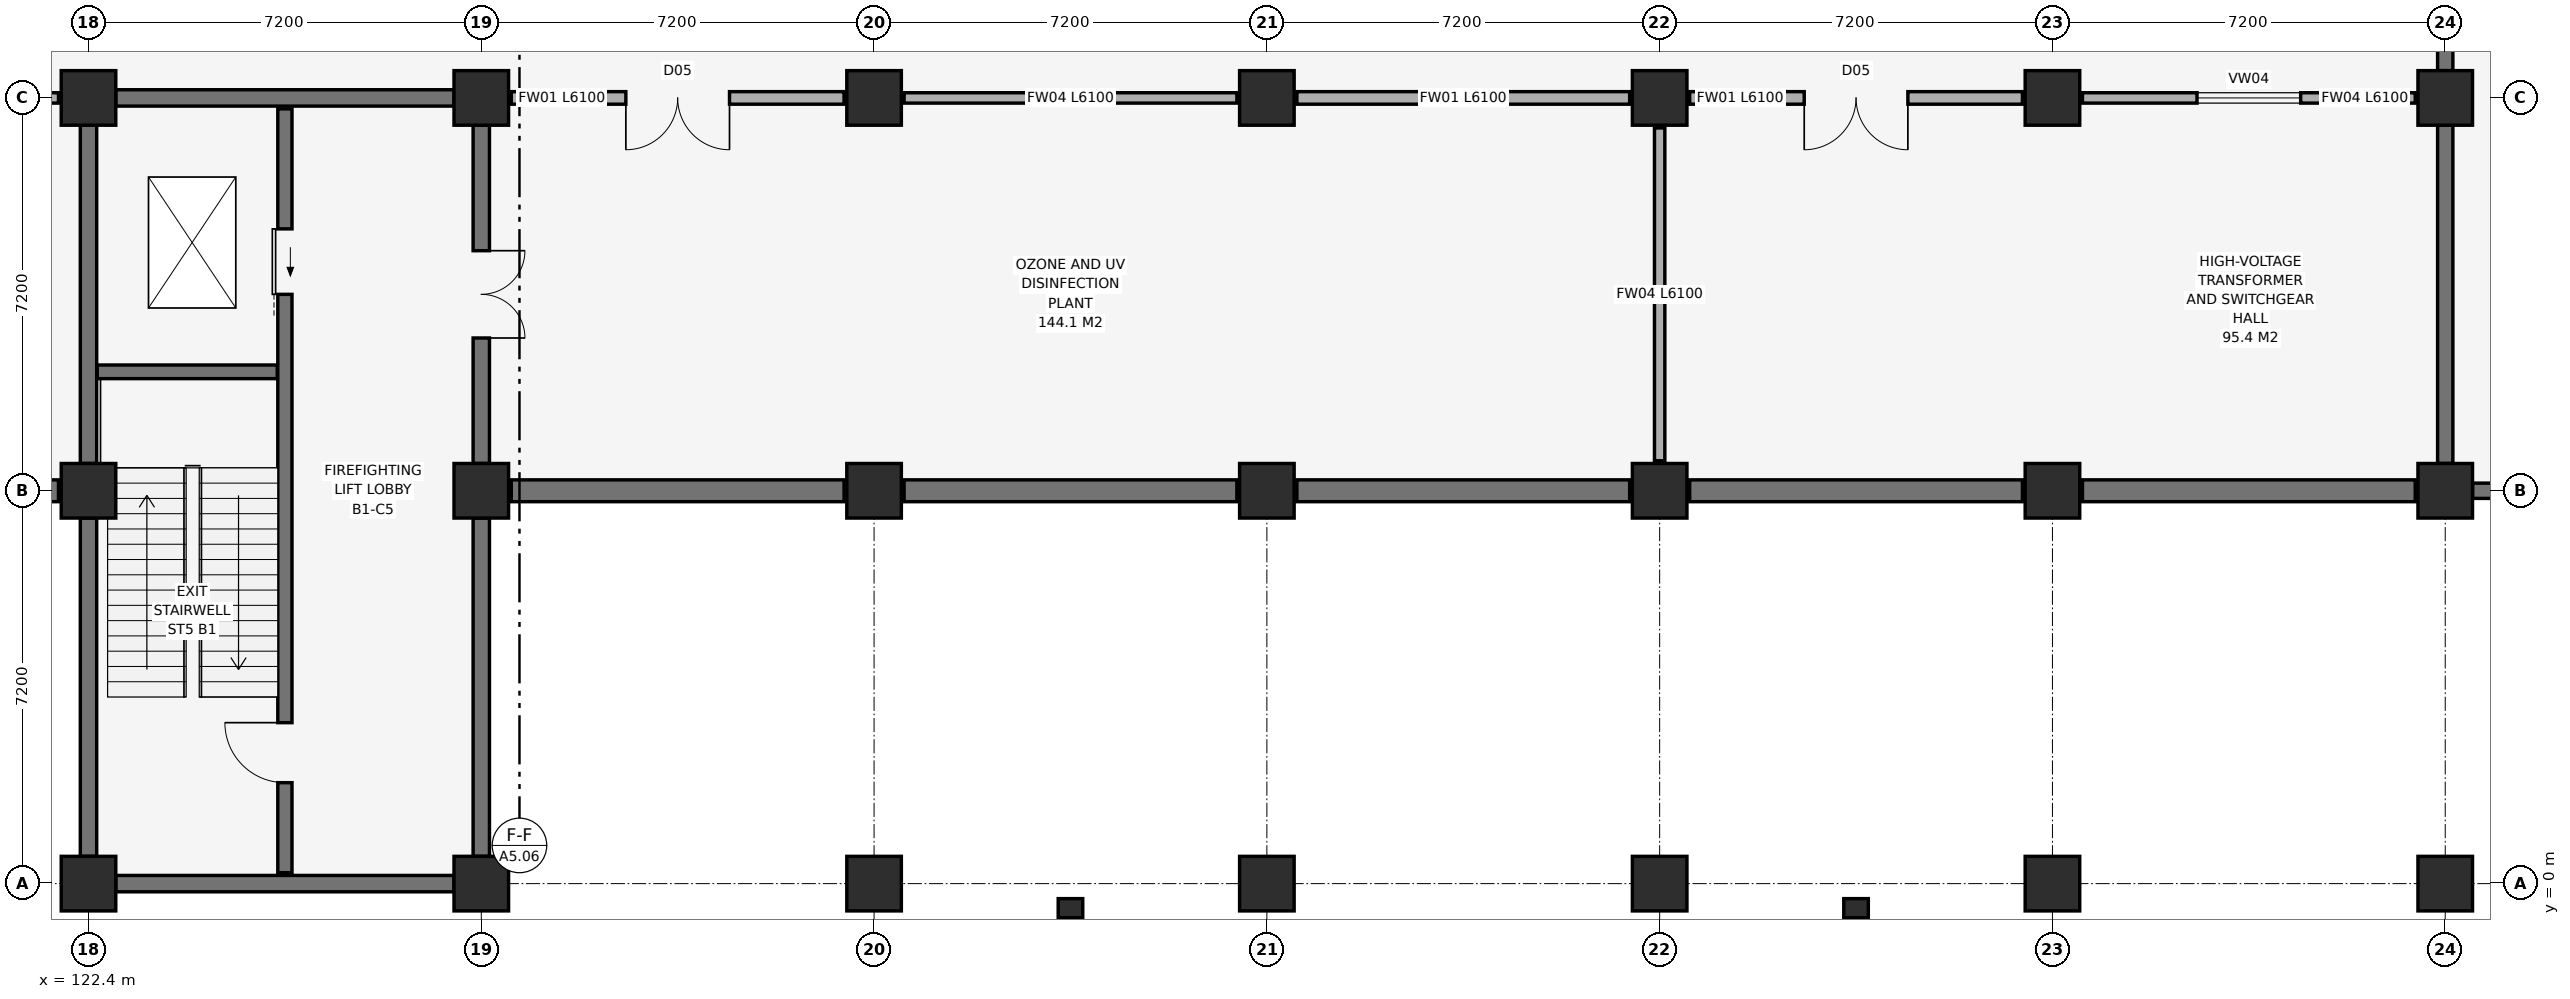
"""IFC4 building model, lengths in metres.
Left out: names, types, materials, properties, quantities, classifications, styles, units other than length and angle.
Written with IfcOpenShell. Run it as: python <this file> out.ifc"""

import sys

from ifc_helpers import new_model, si_unit, direction, frame, frame_2d, origin, origin_2d, place, context, subcontext, project, spatial, rectangle, extrude, element, fill, save


model = new_model("IFC4")
c1 = context("Model", 3, precision=1e-05, world=origin(), true_north=direction((0.0, 1.0)))
c2 = subcontext(c1, "Body", "Model", "MODEL_VIEW")
j1 = project(units=[si_unit("LENGTHUNIT", "METRE"), si_unit("PLANEANGLEUNIT", "RADIAN")], contexts=[c1])
p1 = place(None, origin())
s1 = spatial("IfcSite", under=j1, at=p1, CompositionType="ELEMENT")
p2 = place(p1, origin())
s2 = spatial("IfcBuilding", under=s1, at=p2, CompositionType="ELEMENT")
p3 = place(p2, frame((0.0, 0.0, -5.4)))
s3 = spatial("IfcBuildingStorey", under=s2, at=p3, CompositionType="ELEMENT", Elevation=-5.4)
for number, where, z_axis, x_axis in (
    (1, (122.4, 0.0, -0.45), (0.0, 0.0, 1.0), (1.0, 0.0, 0.0)),
    (2, (122.4, 7.2, -0.45), (0.0, 0.0, 1.0), (1.0, 0.0, 0.0)),
    (3, (122.4, 14.4, -0.45), (0.0, 0.0, 1.0), (1.0, 0.0, 0.0)),
    (4, (129.6, 0.0, -0.45), (0.0, 0.0, 1.0), (1.0, 0.0, 0.0)),
    (5, (129.6, 7.2, -0.45), (0.0, 0.0, 1.0), (1.0, 0.0, 0.0)),
    (6, (129.6, 14.4, -0.45), (0.0, 0.0, 1.0), (1.0, 0.0, 0.0)),
    (7, (136.8, 0.0, -0.45), (0.0, 0.0, 1.0), (1.0, 0.0, 0.0)),
    (8, (136.8, 7.2, -0.45), (0.0, 0.0, 1.0), (1.0, 0.0, 0.0)),
    (9, (136.8, 14.4, -0.45), (0.0, 0.0, 1.0), (1.0, 0.0, 0.0)),
    (10, (144.0, 0.0, -0.45), (0.0, 0.0, 1.0), (1.0, 0.0, 0.0)),
    (11, (144.0, 7.2, -0.45), (0.0, 0.0, 1.0), (1.0, 0.0, 0.0)),
    (12, (144.0, 14.4, -0.45), (0.0, 0.0, 1.0), (1.0, 0.0, 0.0)),
    (13, (151.2, 0.0, -0.45), (0.0, 0.0, 1.0), (1.0, 0.0, 0.0)),
    (14, (151.2, 7.2, -0.45), (0.0, 0.0, 1.0), (1.0, 0.0, 0.0)),
    (15, (151.2, 14.4, -0.45), (0.0, 0.0, 1.0), (1.0, 0.0, 0.0)),
    (16, (158.4, 0.0, -0.45), (0.0, 0.0, 1.0), (1.0, 0.0, 0.0)),
    (17, (158.4, 7.2, -0.45), (0.0, 0.0, 1.0), (1.0, 0.0, 0.0)),
    (18, (158.4, 14.4, -0.45), (0.0, 0.0, 1.0), (1.0, 0.0, 0.0)),
    (19, (165.6, 0.0, -0.45), (0.0, 0.0, 1.0), (1.0, 0.0, 0.0)),
    (20, (165.6, 7.2, -0.45), (0.0, 0.0, 1.0), (1.0, 0.0, 0.0)),
    (21, (165.6, 14.4, -0.45), (0.0, 0.0, 1.0), (1.0, 0.0, 0.0)),
):
    element("IfcColumn", number, at=place(p3, frame(where, z_axis=z_axis, x_axis=x_axis)), inside=s3, PredefinedType="COLUMN", context=c2, shape_type="SweptSolid", body=[
        extrude(rectangle(XDim=1.0, YDim=1.0, at=origin_2d()), origin(), (0.0, 0.0, 1.0), 5.85),
    ])
for number, where, z_axis, x_axis in (
    (22, (115.75, 7.2, 0.0), (0.0, 0.0, 1.0), (1.0, 0.0, 0.0)),
    (23, (130.15, 7.2, 0.0), (0.0, 0.0, 1.0), (1.0, 0.0, 0.0)),
):
    element("IfcWall", number, at=place(p3, frame(where, z_axis=z_axis, x_axis=x_axis)), inside=s3, PredefinedType="USERDEFINED", context=c2, shape_type="SweptSolid", body=[
        extrude(rectangle(XDim=6.1, YDim=0.4, at=frame_2d((3.05, 0.0))), origin(), (0.0, 0.0, 1.0), 5.12),
    ])
for number, where, z_axis, x_axis in (
    (24, (137.35, 7.2, 0.0), (0.0, 0.0, 1.0), (1.0, 0.0, 0.0)),
    (25, (144.55, 7.2, 0.0), (0.0, 0.0, 1.0), (1.0, 0.0, 0.0)),
):
    element("IfcWall", number, at=place(p3, frame(where, z_axis=z_axis, x_axis=x_axis)), inside=s3, PredefinedType="USERDEFINED", context=c2, shape_type="SweptSolid", body=[
        extrude(rectangle(XDim=6.1, YDim=0.4, at=frame_2d((3.05, 0.0))), origin(), (0.0, 0.0, 1.0), 5.12),
    ])
for number, where, z_axis, x_axis in (
    (26, (151.75, 7.2, 0.0), (0.0, 0.0, 1.0), (1.0, 0.0, 0.0)),
    (27, (158.95, 7.2, 0.0), (0.0, 0.0, 1.0), (1.0, 0.0, 0.0)),
):
    element("IfcWall", number, at=place(p3, frame(where, z_axis=z_axis, x_axis=x_axis)), inside=s3, PredefinedType="USERDEFINED", context=c2, shape_type="SweptSolid", body=[
        extrude(rectangle(XDim=6.1, YDim=0.4, at=frame_2d((3.05, 0.0))), origin(), (0.0, 0.0, 1.0), 5.12),
    ])
for number, where, z_axis, x_axis in (
    (28, (122.9, 0.0, 0.0), (0.0, 0.0, 1.0), (1.0, 0.0, 0.0)),
    (29, (122.9, 14.4, 0.0), (0.0, 0.0, 1.0), (1.0, 0.0, 0.0)),
):
    element("IfcWall", number, at=place(p3, frame(where, z_axis=z_axis, x_axis=x_axis)), inside=s3, PredefinedType="SHEAR", context=c2, shape_type="SweptSolid", body=[
        extrude(rectangle(XDim=6.2, YDim=0.3, at=frame_2d((3.1, 0.0))), origin(), (0.0, 0.0, 1.0), 5.12),
    ])
for number, where, z_axis, x_axis in (
    (30, (122.4, 0.5, 0.0), (0.0, 0.0, 1.0), (0.0, 1.0, 0.0)),
    (31, (122.4, 7.7, 0.0), (0.0, 0.0, 1.0), (0.0, 1.0, 0.0)),
    (32, (129.6, 0.5, 0.0), (0.0, 0.0, 1.0), (0.0, 1.0, 0.0)),
):
    element("IfcWall", number, at=place(p3, frame(where, z_axis=z_axis, x_axis=x_axis)), inside=s3, PredefinedType="SHEAR", context=c2, shape_type="SweptSolid", body=[
        extrude(rectangle(XDim=6.2, YDim=0.3, at=frame_2d((3.1, 0.0))), origin(), (0.0, 0.0, 1.0), 5.12),
    ])
p4 = place(p3, frame((129.6, 7.7, 0.0), z_axis=(0.0, 0.0, 1.0), x_axis=(0.0, 1.0, 0.0)))
e33 = element("IfcWall", 33, at=p4, inside=s3, PredefinedType="SHEAR", context=c2, shape_type="SweptSolid", body=[
    extrude(rectangle(XDim=6.2, YDim=0.3, at=frame_2d((3.1, 0.0))), origin(), (0.0, 0.0, 1.0), 5.12),
])
p5 = place(p4, frame((2.3, 0.0, 0.0)))
e34 = element("IfcOpeningElement", 34, at=p5, cuts=e33, PredefinedType="OPENING", context=c2, shape_type="SweptSolid", body=[
    extrude(rectangle(XDim=1.6, YDim=2.2, at=frame_2d((0.8, 1.1))), frame((0.0, 0.165, 0.0), z_axis=(0.0, -1.0, 0.0), x_axis=(1.0, 0.0, 0.0)), (0.0, 0.0, 1.0), 0.33),
])
p6 = place(p3, frame((126.0, 0.2, 0.0), z_axis=(0.0, 0.0, 1.0), x_axis=(0.0, 1.0, 0.0)))
e35 = element("IfcWall", 35, at=p6, inside=s3, PredefinedType="SHEAR", context=c2, shape_type="SweptSolid", body=[
    extrude(rectangle(XDim=14.0, YDim=0.26, at=frame_2d((7.0, 0.0))), origin(), (0.0, 0.0, 1.0), 5.12),
])
p7 = place(p6, frame((1.65, 0.0, 0.0)))
e36 = element("IfcOpeningElement", 36, at=p7, cuts=e35, PredefinedType="OPENING", context=c2, shape_type="SweptSolid", body=[
    extrude(rectangle(XDim=1.1, YDim=2.15, at=frame_2d((0.55, 1.075))), frame((0.0, 0.145, 0.0), z_axis=(0.0, -1.0, 0.0), x_axis=(1.0, 0.0, 0.0)), (0.0, 0.0, 1.0), 0.29),
])
p8 = place(p6, frame((10.6, 0.0, 0.0)))
e37 = element("IfcOpeningElement", 37, at=p8, cuts=e35, PredefinedType="OPENING", context=c2, shape_type="SweptSolid", body=[
    extrude(rectangle(XDim=1.2, YDim=2.25, at=frame_2d((0.6, 1.125))), frame((0.0, 0.145, 0.0), z_axis=(0.0, -1.0, 0.0), x_axis=(1.0, 0.0, 0.0)), (0.0, 0.0, 1.0), 0.29),
])
p9 = place(p3, frame((122.56, 9.38, 0.0), z_axis=(0.0, 0.0, 1.0), x_axis=(1.0, 0.0, 0.0)))
e38 = element("IfcWall", 38, at=p9, inside=s3, PredefinedType="SHEAR", context=c2, shape_type="SweptSolid", body=[
    extrude(rectangle(XDim=3.3, YDim=0.25, at=frame_2d((1.65, 0.0))), origin(), (0.0, 0.0, 1.0), 5.12),
])
for number, where, z_axis, x_axis in (
    (39, (166.1, 7.2, 0.0), (0.0, 0.0, 1.0), (1.0, 0.0, 0.0)),
    (40, (165.6, 7.7, 0.0), (0.0, 0.0, 1.0), (0.0, 1.0, 0.0)),
):
    element("IfcWall", number, at=place(p3, frame(where, z_axis=z_axis, x_axis=x_axis)), inside=s3, PredefinedType="SHEAR", context=c2, shape_type="SweptSolid", body=[
        extrude(rectangle(XDim=6.2, YDim=0.28, at=frame_2d((3.1, 0.0))), origin(), (0.0, 0.0, 1.0), 5.12),
    ])
p10 = place(p3, frame((165.6, 14.9, 0.0), z_axis=(0.0, 0.0, 1.0), x_axis=(0.0, 1.0, 0.0)))
e41 = element("IfcWall", 41, at=p10, inside=s3, PredefinedType="SHEAR", context=c2, shape_type="SweptSolid", body=[
    extrude(rectangle(XDim=6.2, YDim=0.28, at=frame_2d((3.1, 0.0))), origin(), (0.0, 0.0, 1.0), 5.12),
])
p11 = place(p10, frame((2.3, 0.0, 0.0)))
e42 = element("IfcOpeningElement", 42, at=p11, cuts=e41, PredefinedType="OPENING", context=c2, shape_type="SweptSolid", body=[
    extrude(rectangle(XDim=1.6, YDim=2.2, at=frame_2d((0.8, 1.1))), frame((0.0, 0.155, 0.0), z_axis=(0.0, -1.0, 0.0), x_axis=(1.0, 0.0, 0.0)), (0.0, 0.0, 1.0), 0.31),
])
p12 = place(p3, frame((115.75, 14.4, 0.0), z_axis=(0.0, 0.0, 1.0), x_axis=(1.0, 0.0, 0.0)))
e43 = element("IfcWall", 43, at=p12, inside=s3, PredefinedType="SOLIDWALL", context=c2, shape_type="SweptSolid", body=[
    extrude(rectangle(XDim=6.1, YDim=0.19, at=frame_2d((3.05, 0.0))), origin(), (0.0, 0.0, 1.0), 4.17),
])
p13 = place(p12, frame((2.1, 0.0, 0.0)))
e44 = element("IfcOpeningElement", 44, at=p13, cuts=e43, PredefinedType="OPENING", context=c2, shape_type="SweptSolid", body=[
    extrude(rectangle(XDim=1.9, YDim=2.35, at=frame_2d((0.95, 1.175))), frame((0.0, 0.11, 0.0), z_axis=(0.0, -1.0, 0.0), x_axis=(1.0, 0.0, 0.0)), (0.0, 0.0, 1.0), 0.22),
])
p14 = place(p3, frame((130.15, 14.4, 0.0), z_axis=(0.0, 0.0, 1.0), x_axis=(1.0, 0.0, 0.0)))
e45 = element("IfcWall", 45, at=p14, inside=s3, PredefinedType="SOLIDWALL", context=c2, shape_type="SweptSolid", body=[
    extrude(rectangle(XDim=6.1, YDim=0.23, at=frame_2d((3.05, 0.0))), origin(), (0.0, 0.0, 1.0), 4.17),
])
p15 = place(p14, frame((2.1, 0.0, 0.0)))
e46 = element("IfcOpeningElement", 46, at=p15, cuts=e45, PredefinedType="OPENING", context=c2, shape_type="SweptSolid", body=[
    extrude(rectangle(XDim=1.9, YDim=2.35, at=frame_2d((0.95, 1.175))), frame((0.0, 0.13, 0.0), z_axis=(0.0, -1.0, 0.0), x_axis=(1.0, 0.0, 0.0)), (0.0, 0.0, 1.0), 0.26),
])
p16 = place(p3, frame((137.35, 14.4, 0.0), z_axis=(0.0, 0.0, 1.0), x_axis=(1.0, 0.0, 0.0)))
e47 = element("IfcWall", 47, at=p16, inside=s3, PredefinedType="SOLIDWALL", context=c2, shape_type="SweptSolid", body=[
    extrude(rectangle(XDim=6.1, YDim=0.19, at=frame_2d((3.05, 0.0))), origin(), (0.0, 0.0, 1.0), 4.17),
])
p17 = place(p3, frame((144.55, 14.4, 0.0), z_axis=(0.0, 0.0, 1.0), x_axis=(1.0, 0.0, 0.0)))
e48 = element("IfcWall", 48, at=p17, inside=s3, PredefinedType="SOLIDWALL", context=c2, shape_type="SweptSolid", body=[
    extrude(rectangle(XDim=6.1, YDim=0.23, at=frame_2d((3.05, 0.0))), origin(), (0.0, 0.0, 1.0), 4.17),
])
p18 = place(p3, frame((151.2, 7.75, 0.0), z_axis=(0.0, 0.0, 1.0), x_axis=(0.0, 1.0, 0.0)))
e49 = element("IfcWall", 49, at=p18, inside=s3, PredefinedType="SOLIDWALL", context=c2, shape_type="SweptSolid", body=[
    extrude(rectangle(XDim=6.1, YDim=0.19, at=frame_2d((3.05, 0.0))), origin(), (0.0, 0.0, 1.0), 4.37),
])
p19 = place(p3, frame((151.75, 14.4, 0.0), z_axis=(0.0, 0.0, 1.0), x_axis=(1.0, 0.0, 0.0)))
e50 = element("IfcWall", 50, at=p19, inside=s3, PredefinedType="SOLIDWALL", context=c2, shape_type="SweptSolid", body=[
    extrude(rectangle(XDim=6.1, YDim=0.23, at=frame_2d((3.05, 0.0))), origin(), (0.0, 0.0, 1.0), 4.17),
])
p20 = place(p19, frame((2.1, 0.0, 0.0)))
e51 = element("IfcOpeningElement", 51, at=p20, cuts=e50, PredefinedType="OPENING", context=c2, shape_type="SweptSolid", body=[
    extrude(rectangle(XDim=1.9, YDim=2.35, at=frame_2d((0.95, 1.175))), frame((0.0, 0.13, 0.0), z_axis=(0.0, -1.0, 0.0), x_axis=(1.0, 0.0, 0.0)), (0.0, 0.0, 1.0), 0.26),
])
p21 = place(p3, frame((158.95, 14.4, 0.0), z_axis=(0.0, 0.0, 1.0), x_axis=(1.0, 0.0, 0.0)))
e52 = element("IfcWall", 52, at=p21, inside=s3, PredefinedType="SOLIDWALL", context=c2, shape_type="SweptSolid", body=[
    extrude(rectangle(XDim=6.1, YDim=0.19, at=frame_2d((3.05, 0.0))), origin(), (0.0, 0.0, 1.0), 4.17),
])
p22 = place(p21, frame((2.1, 0.0, 0.95)))
e53 = element("IfcOpeningElement", 53, at=p22, cuts=e52, PredefinedType="OPENING", context=c2, shape_type="SweptSolid", body=[
    extrude(rectangle(XDim=1.9, YDim=1.5, at=frame_2d((0.95, 0.75))), frame((0.0, 0.11, 0.0), z_axis=(0.0, -1.0, 0.0), x_axis=(1.0, 0.0, 0.0)), (0.0, 0.0, 1.0), 0.22),
])
for number, where, z_axis, x_axis in (
    (54, (140.4, -0.45, -0.45), (0.0, 0.0, 1.0), (1.0, 0.0, 0.0)),
    (55, (154.8, -0.45, -0.45), (0.0, 0.0, 1.0), (1.0, 0.0, 0.0)),
):
    element("IfcColumn", number, at=place(p3, frame(where, z_axis=z_axis, x_axis=x_axis)), inside=s3, PredefinedType="PILASTER", context=c2, shape_type="SweptSolid", body=[
        extrude(rectangle(XDim=0.45, YDim=0.35, at=origin_2d()), origin(), (0.0, 0.0, 1.0), 5.85),
    ])
p23 = place(p7, origin())
e56 = element("IfcDoor", 56, at=p23, inside=s3, OperationType="SINGLE_SWING_RIGHT", PredefinedType="DOOR", context=c2, shape_type="SweptSolid", body=[
    extrude(rectangle(XDim=1.1, YDim=2.15, at=frame_2d((0.55, 1.075))), frame((0.0, 0.025, 0.0), z_axis=(0.0, -1.0, 0.0), x_axis=(1.0, 0.0, 0.0)), (0.0, 0.0, 1.0), 0.05),
])
fill(e36, e56)
p24 = place(p8, frame((1.2, 0.0, 0.0), z_axis=(0.0, 0.0, 1.0), x_axis=(-1.0, 0.0, 0.0)))
e57 = element("IfcDoor", 57, at=p24, inside=s3, OperationType="SLIDING_TO_LEFT", PredefinedType="DOOR", context=c2, shape_type="SweptSolid", body=[
    extrude(rectangle(XDim=1.2, YDim=2.25, at=frame_2d((0.6, 1.125))), frame((0.0, 0.025, 0.0), z_axis=(0.0, -1.0, 0.0), x_axis=(1.0, 0.0, 0.0)), (0.0, 0.0, 1.0), 0.05),
])
fill(e37, e57)
p25 = place(p5, frame((1.6, 0.0, 0.0), z_axis=(0.0, 0.0, 1.0), x_axis=(-1.0, 0.0, 0.0)))
e58 = element("IfcDoor", 58, at=p25, inside=s3, OperationType="DOUBLE_SWING_LEFT", PredefinedType="DOOR", context=c2, shape_type="SweptSolid", body=[
    extrude(rectangle(XDim=1.6, YDim=2.2, at=frame_2d((0.8, 1.1))), frame((0.0, 0.025, 0.0), z_axis=(0.0, -1.0, 0.0), x_axis=(1.0, 0.0, 0.0)), (0.0, 0.0, 1.0), 0.05),
])
fill(e34, e58)
p26 = place(p15, frame((1.9, 0.0, 0.0), z_axis=(0.0, 0.0, 1.0), x_axis=(-1.0, 0.0, 0.0)))
e59 = element("IfcDoor", 59, at=p26, inside=s3, OperationType="DOUBLE_SWING_LEFT", PredefinedType="DOOR", context=c2, shape_type="SweptSolid", body=[
    extrude(rectangle(XDim=1.9, YDim=2.35, at=frame_2d((0.95, 1.175))), frame((0.0, 0.025, 0.0), z_axis=(0.0, -1.0, 0.0), x_axis=(1.0, 0.0, 0.0)), (0.0, 0.0, 1.0), 0.05),
])
fill(e46, e59)
p27 = place(p20, frame((1.9, 0.0, 0.0), z_axis=(0.0, 0.0, 1.0), x_axis=(-1.0, 0.0, 0.0)))
e60 = element("IfcDoor", 60, at=p27, inside=s3, OperationType="DOUBLE_SWING_LEFT", PredefinedType="DOOR", context=c2, shape_type="SweptSolid", body=[
    extrude(rectangle(XDim=1.9, YDim=2.35, at=frame_2d((0.95, 1.175))), frame((0.0, 0.025, 0.0), z_axis=(0.0, -1.0, 0.0), x_axis=(1.0, 0.0, 0.0)), (0.0, 0.0, 1.0), 0.05),
])
fill(e51, e60)
p28 = place(p22, origin())
e61 = element("IfcWindow", 61, at=p28, inside=s3, PartitioningType="SINGLE_PANEL", PredefinedType="WINDOW", context=c2, shape_type="SweptSolid", body=[
    extrude(rectangle(XDim=1.9, YDim=1.5, at=frame_2d((0.95, 0.75))), frame((0.0, 0.03, 0.0), z_axis=(0.0, -1.0, 0.0), x_axis=(1.0, 0.0, 0.0)), (0.0, 0.0, 1.0), 0.06),
])
fill(e53, e61)
save(model, sys.argv[1])
